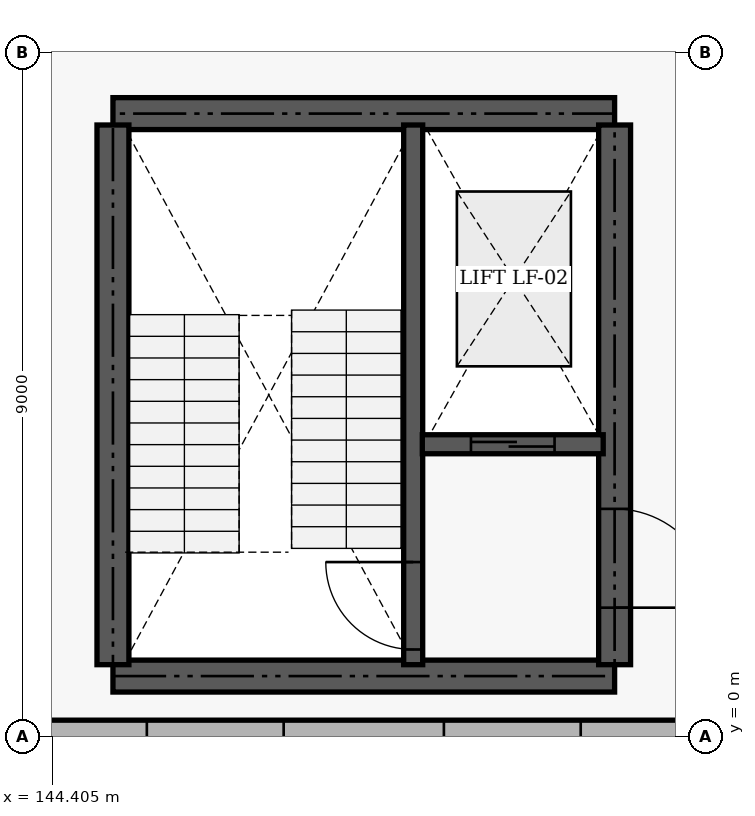
"""IFC4 building model, lengths in metres.
Left out: names, types, materials, properties, quantities, classifications, styles, units other than length and angle.
Written with IfcOpenShell. Run it as: python <this file> out.ifc"""

import sys

from ifc_helpers import new_model, si_unit, direction, frame, frame_2d, origin, place, context, subcontext, project, spatial, rectangle, extrude, element, fill, save


model = new_model("IFC4")
c1 = context("Model", 3, precision=1e-05, world=origin(), true_north=direction((0.0, 1.0)))
c2 = subcontext(c1, "Body", "Model", "MODEL_VIEW")
j1 = project(units=[si_unit("LENGTHUNIT", "METRE"), si_unit("PLANEANGLEUNIT", "RADIAN")], contexts=[c1])
p1 = place(None, origin())
s1 = spatial("IfcSite", under=j1, at=p1, CompositionType="ELEMENT")
p2 = place(p1, origin())
s2 = spatial("IfcBuilding", under=s1, at=p2, CompositionType="ELEMENT")
p3 = place(p2, frame((0.0, 0.0, 5.4)))
s3 = spatial("IfcBuildingStorey", under=s2, at=p3, CompositionType="ELEMENT", Elevation=5.4)
p4 = place(p3, frame((144.06, 0.0, 0.0), z_axis=(0.0, 0.0, 1.0), x_axis=(1.0, 0.0, 0.0)))
e1 = element("IfcWall", 1, at=p4, inside=s3, PredefinedType="SOLIDWALL", context=c2, shape_type="SweptSolid", body=[
    extrude(rectangle(XDim=8.88, YDim=0.44, at=frame_2d((4.44, 0.0))), origin(), (0.0, 0.0, 1.0), 3.5),
])
p5 = place(p4, frame((1.586, 0.0, 0.9)))
e2 = element("IfcOpeningElement", 2, at=p5, cuts=e1, PredefinedType="OPENING", context=c2, shape_type="SweptSolid", body=[
    extrude(rectangle(XDim=1.8, YDim=2.1, at=frame_2d((0.9, 1.05))), frame((0.0, 0.23, 0.0), z_axis=(0.0, -1.0, 0.0), x_axis=(1.0, 0.0, 0.0)), (0.0, 0.0, 1.0), 0.46),
])
p6 = place(p4, frame((5.494, 0.0, 0.9)))
e3 = element("IfcOpeningElement", 3, at=p6, cuts=e1, PredefinedType="OPENING", context=c2, shape_type="SweptSolid", body=[
    extrude(rectangle(XDim=1.8, YDim=2.1, at=frame_2d((0.9, 1.05))), frame((0.0, 0.23, 0.0), z_axis=(0.0, -1.0, 0.0), x_axis=(1.0, 0.0, 0.0)), (0.0, 0.0, 1.0), 0.46),
])
for number, where, z_axis, x_axis in (
    (4, (145.2, 0.8, 0.0), (0.0, 0.0, 1.0), (1.0, 0.0, 0.0)),
    (5, (145.2, 8.2, 0.0), (0.0, 0.0, 1.0), (1.0, 0.0, 0.0)),
):
    element("IfcWall", number, at=place(p3, frame(where, z_axis=z_axis, x_axis=x_axis)), inside=s3, PredefinedType="SHEAR", context=c2, shape_type="SweptSolid", body=[
        extrude(rectangle(XDim=6.6, YDim=0.42, at=frame_2d((3.3, 0.0))), origin(), (0.0, 0.0, 1.0), 4.2),
    ])
p7 = place(p3, frame((145.2, 0.95, 0.0), z_axis=(0.0, 0.0, 1.0), x_axis=(0.0, 1.0, 0.0)))
e6 = element("IfcWall", 6, at=p7, inside=s3, PredefinedType="SHEAR", context=c2, shape_type="SweptSolid", body=[
    extrude(rectangle(XDim=7.1, YDim=0.42, at=frame_2d((3.55, 0.0))), origin(), (0.0, 0.0, 1.0), 4.2),
])
p8 = place(p3, frame((151.8, 0.95, 0.0), z_axis=(0.0, 0.0, 1.0), x_axis=(0.0, 1.0, 0.0)))
e7 = element("IfcWall", 7, at=p8, inside=s3, PredefinedType="SHEAR", context=c2, shape_type="SweptSolid", body=[
    extrude(rectangle(XDim=7.1, YDim=0.42, at=frame_2d((3.55, 0.0))), origin(), (0.0, 0.0, 1.0), 4.2),
])
p9 = place(p8, frame((0.75, 0.0, 0.0)))
e8 = element("IfcOpeningElement", 8, at=p9, cuts=e7, PredefinedType="OPENING", context=c2, shape_type="SweptSolid", body=[
    extrude(rectangle(XDim=1.3, YDim=2.15, at=frame_2d((0.65, 1.075))), frame((0.0, 0.22, 0.0), z_axis=(0.0, -1.0, 0.0), x_axis=(1.0, 0.0, 0.0)), (0.0, 0.0, 1.0), 0.44),
])
p10 = place(p3, frame((149.15, 0.95, 0.0), z_axis=(0.0, 0.0, 1.0), x_axis=(0.0, 1.0, 0.0)))
e9 = element("IfcWall", 9, at=p10, inside=s3, PredefinedType="SHEAR", context=c2, shape_type="SweptSolid", body=[
    extrude(rectangle(XDim=7.1, YDim=0.25, at=frame_2d((3.55, 0.0))), origin(), (0.0, 0.0, 1.0), 4.2),
])
p11 = place(p10, frame((0.2, 0.0, 0.0)))
e10 = element("IfcOpeningElement", 10, at=p11, cuts=e9, PredefinedType="OPENING", context=c2, shape_type="SweptSolid", body=[
    extrude(rectangle(XDim=1.15, YDim=2.15, at=frame_2d((0.575, 1.075))), frame((0.0, 0.135, 0.0), z_axis=(0.0, -1.0, 0.0), x_axis=(1.0, 0.0, 0.0)), (0.0, 0.0, 1.0), 0.27),
])
p12 = place(p3, frame((149.27, 3.85, 0.0), z_axis=(0.0, 0.0, 1.0), x_axis=(1.0, 0.0, 0.0)))
e11 = element("IfcWall", 11, at=p12, inside=s3, PredefinedType="SHEAR", context=c2, shape_type="SweptSolid", body=[
    extrude(rectangle(XDim=2.38, YDim=0.25, at=frame_2d((1.19, 0.0))), origin(), (0.0, 0.0, 1.0), 4.2),
])
p13 = place(p12, frame((0.64, 0.0, 0.0)))
e12 = element("IfcOpeningElement", 12, at=p13, cuts=e11, PredefinedType="OPENING", context=c2, shape_type="SweptSolid", body=[
    extrude(rectangle(XDim=1.1, YDim=2.15, at=frame_2d((0.55, 1.075))), frame((0.0, 0.135, 0.0), z_axis=(0.0, -1.0, 0.0), x_axis=(1.0, 0.0, 0.0)), (0.0, 0.0, 1.0), 0.27),
])
p14 = place(p5, origin())
e13 = element("IfcWindow", 13, at=p14, inside=s3, PartitioningType="SINGLE_PANEL", PredefinedType="WINDOW", context=c2, shape_type="SweptSolid", body=[
    extrude(rectangle(XDim=1.8, YDim=2.1, at=frame_2d((0.9, 1.05))), frame((0.0, 0.03, 0.0), z_axis=(0.0, -1.0, 0.0), x_axis=(1.0, 0.0, 0.0)), (0.0, 0.0, 1.0), 0.06),
])
fill(e2, e13)
p15 = place(p6, origin())
e14 = element("IfcWindow", 14, at=p15, inside=s3, PartitioningType="SINGLE_PANEL", PredefinedType="WINDOW", context=c2, shape_type="SweptSolid", body=[
    extrude(rectangle(XDim=1.8, YDim=2.1, at=frame_2d((0.9, 1.05))), frame((0.0, 0.03, 0.0), z_axis=(0.0, -1.0, 0.0), x_axis=(1.0, 0.0, 0.0)), (0.0, 0.0, 1.0), 0.06),
])
fill(e3, e14)
p16 = place(p9, frame((1.3, 0.0, 0.0), z_axis=(0.0, 0.0, 1.0), x_axis=(-1.0, 0.0, 0.0)))
e15 = element("IfcDoor", 15, at=p16, inside=s3, OperationType="DOUBLE_DOOR_SINGLE_SWING", PredefinedType="DOOR", context=c2, shape_type="SweptSolid", body=[
    extrude(rectangle(XDim=1.3, YDim=2.15, at=frame_2d((0.65, 1.075))), frame((0.0, 0.025, 0.0), z_axis=(0.0, -1.0, 0.0), x_axis=(1.0, 0.0, 0.0)), (0.0, 0.0, 1.0), 0.05),
])
fill(e8, e15)
p17 = place(p11, frame((1.15, 0.0, 0.0), z_axis=(0.0, 0.0, 1.0), x_axis=(-1.0, 0.0, 0.0)))
e16 = element("IfcDoor", 16, at=p17, inside=s3, OperationType="SINGLE_SWING_RIGHT", PredefinedType="DOOR", context=c2, shape_type="SweptSolid", body=[
    extrude(rectangle(XDim=1.15, YDim=2.15, at=frame_2d((0.575, 1.075))), frame((0.0, 0.025, 0.0), z_axis=(0.0, -1.0, 0.0), x_axis=(1.0, 0.0, 0.0)), (0.0, 0.0, 1.0), 0.05),
])
fill(e10, e16)
p18 = place(p13, origin())
e17 = element("IfcDoor", 17, at=p18, inside=s3, OperationType="SLIDING_TO_LEFT", PredefinedType="DOOR", context=c2, shape_type="SweptSolid", body=[
    extrude(rectangle(XDim=1.1, YDim=2.15, at=frame_2d((0.55, 1.075))), frame((0.0, 0.025, 0.0), z_axis=(0.0, -1.0, 0.0), x_axis=(1.0, 0.0, 0.0)), (0.0, 0.0, 1.0), 0.05),
])
fill(e12, e17)
save(model, sys.argv[1])
